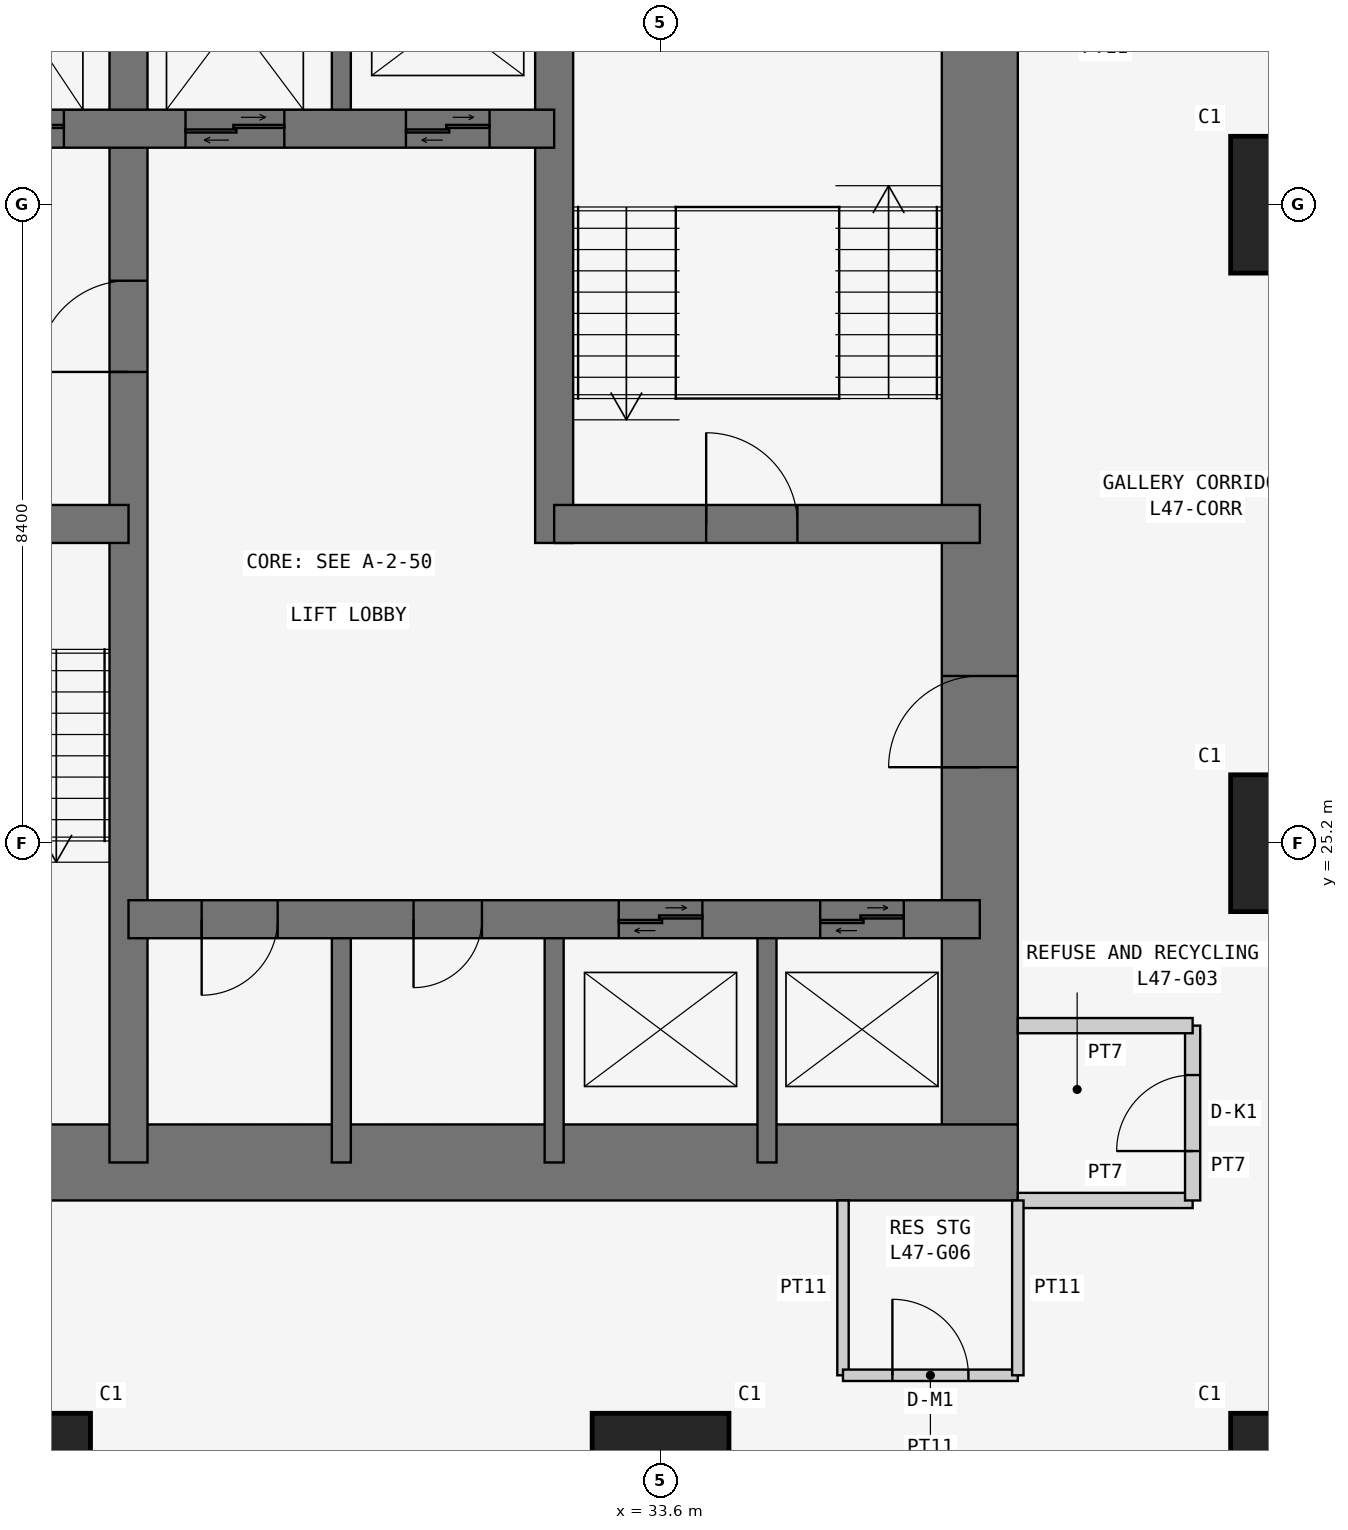
"""IFC4 building model, lengths in metres.
Left out: names, types, materials, properties, quantities, classifications, styles, units other than length and angle.
Written with IfcOpenShell. Run it as: python <this file> out.ifc"""

import sys

from ifc_helpers import new_model, si_unit, direction, frame, frame_2d, origin, origin_2d, place, context, subcontext, project, spatial, rectangle, extrude, element, fill, save


model = new_model("IFC4")
c1 = context("Model", 3, precision=1e-05, world=origin(), true_north=direction((0.0, 1.0)))
c2 = subcontext(c1, "Body", "Model", "MODEL_VIEW")
j1 = project(units=[si_unit("LENGTHUNIT", "METRE"), si_unit("PLANEANGLEUNIT", "RADIAN")], contexts=[c1])
p1 = place(None, origin())
s1 = spatial("IfcSite", under=j1, at=p1, CompositionType="ELEMENT")
p2 = place(p1, origin())
s2 = spatial("IfcBuilding", under=s1, at=p2, CompositionType="ELEMENT")
p3 = place(p2, frame((0.0, 0.0, 183.3)))
s3 = spatial("IfcBuildingStorey", under=s2, at=p3, CompositionType="ELEMENT", Elevation=183.3)
for number, where, z_axis, x_axis in (
    (1, (25.2, 16.8, 0.0), (0.0, 0.0, 1.0), (1.0, 0.0, 0.0)),
    (2, (33.6, 16.8, 0.0), (0.0, 0.0, 1.0), (1.0, 0.0, 0.0)),
    (3, (42.0, 16.8, 0.0), (0.0, 0.0, 1.0), (1.0, 0.0, 0.0)),
    (4, (42.0, 25.2, 0.0), (0.0, 0.0, 1.0), (1.0, 0.0, 0.0)),
    (5, (42.0, 33.6, 0.0), (0.0, 0.0, 1.0), (1.0, 0.0, 0.0)),
):
    element("IfcColumn", number, at=place(p3, frame(where, z_axis=z_axis, x_axis=x_axis)), inside=s3, PredefinedType="COLUMN", context=c2, shape_type="SweptSolid", body=[
        extrude(rectangle(XDim=1.8, YDim=1.8, at=origin_2d()), origin(), (0.0, 0.0, 1.0), 3.6),
    ])
p4 = place(p3, frame((21.0, 21.0, 0.0), z_axis=(0.0, 0.0, 1.0), x_axis=(1.0, 0.0, 0.0)))
e6 = element("IfcWall", 6, at=p4, inside=s3, PredefinedType="SHEAR", context=c2, shape_type="SweptSolid", body=[
    extrude(rectangle(XDim=17.3, YDim=1.0, at=frame_2d((8.65, 0.0))), origin(), (0.0, 0.0, 1.0), 3.6),
])
p5 = place(p3, frame((37.8, 21.0, 0.0), z_axis=(0.0, 0.0, 1.0), x_axis=(0.0, 1.0, 0.0)))
e7 = element("IfcWall", 7, at=p5, inside=s3, PredefinedType="SHEAR", context=c2, shape_type="SweptSolid", body=[
    extrude(rectangle(XDim=17.3, YDim=1.0, at=frame_2d((8.65, 0.0))), origin(), (0.0, 0.0, 1.0), 3.6),
])
p6 = place(p5, frame((5.2, 0.0, 0.0)))
e8 = element("IfcOpeningElement", 8, at=p6, cuts=e7, PredefinedType="OPENING", context=c2, shape_type="SweptSolid", body=[
    extrude(rectangle(XDim=1.2, YDim=2.1, at=frame_2d((0.6, 1.05))), frame((0.0, 0.51, 0.0), z_axis=(0.0, -1.0, 0.0), x_axis=(1.0, 0.0, 0.0)), (0.0, 0.0, 1.0), 1.02),
])
p7 = place(p3, frame((26.6, 21.0, 0.0), z_axis=(0.0, 0.0, 1.0), x_axis=(0.0, 1.0, 0.0)))
e9 = element("IfcWall", 9, at=p7, inside=s3, PredefinedType="SHEAR", context=c2, shape_type="SweptSolid", body=[
    extrude(rectangle(XDim=16.8, YDim=0.5, at=frame_2d((8.4, 0.0))), origin(), (0.0, 0.0, 1.0), 3.6),
])
p8 = place(p7, frame((10.4, 0.0, 0.0)))
e10 = element("IfcOpeningElement", 10, at=p8, cuts=e9, PredefinedType="OPENING", context=c2, shape_type="SweptSolid", body=[
    extrude(rectangle(XDim=1.2, YDim=2.1, at=frame_2d((0.6, 1.05))), frame((0.0, 0.26, 0.0), z_axis=(0.0, -1.0, 0.0), x_axis=(1.0, 0.0, 0.0)), (0.0, 0.0, 1.0), 0.52),
])
p9 = place(p3, frame((21.0, 29.4, 0.0), z_axis=(0.0, 0.0, 1.0), x_axis=(1.0, 0.0, 0.0)))
e11 = element("IfcWall", 11, at=p9, inside=s3, PredefinedType="SHEAR", context=c2, shape_type="SweptSolid", body=[
    extrude(rectangle(XDim=5.6, YDim=0.5, at=frame_2d((2.8, 0.0))), origin(), (0.0, 0.0, 1.0), 3.6),
])
p10 = place(p9, frame((2.3, 0.0, 0.0)))
e12 = element("IfcOpeningElement", 12, at=p10, cuts=e11, PredefinedType="OPENING", context=c2, shape_type="SweptSolid", body=[
    extrude(rectangle(XDim=1.2, YDim=2.1, at=frame_2d((0.6, 1.05))), frame((0.0, 0.26, 0.0), z_axis=(0.0, -1.0, 0.0), x_axis=(1.0, 0.0, 0.0)), (0.0, 0.0, 1.0), 0.52),
])
p11 = place(p3, frame((21.0, 34.6, 0.0), z_axis=(0.0, 0.0, 1.0), x_axis=(1.0, 0.0, 0.0)))
e13 = element("IfcWall", 13, at=p11, inside=s3, PredefinedType="SHEAR", context=c2, shape_type="SweptSolid", body=[
    extrude(rectangle(XDim=11.2, YDim=0.5, at=frame_2d((5.6, 0.0))), origin(), (0.0, 0.0, 1.0), 3.6),
])
p12 = place(p11, frame((9.25, 0.0, 0.0)))
e14 = element("IfcOpeningElement", 14, at=p12, cuts=e13, PredefinedType="OPENING", context=c2, shape_type="SweptSolid", body=[
    extrude(rectangle(XDim=1.1, YDim=2.1, at=frame_2d((0.55, 1.05))), frame((0.0, 0.26, 0.0), z_axis=(0.0, -1.0, 0.0), x_axis=(1.0, 0.0, 0.0)), (0.0, 0.0, 1.0), 0.52),
])
p13 = place(p11, frame((1.0, 0.0, 0.0)))
e15 = element("IfcOpeningElement", 15, at=p13, cuts=e13, PredefinedType="OPENING", context=c2, shape_type="SweptSolid", body=[
    extrude(rectangle(XDim=1.1, YDim=2.1, at=frame_2d((0.55, 1.05))), frame((0.0, 0.26, 0.0), z_axis=(0.0, -1.0, 0.0), x_axis=(1.0, 0.0, 0.0)), (0.0, 0.0, 1.0), 0.52),
])
p14 = place(p11, frame((3.65, 0.0, 0.0)))
e16 = element("IfcOpeningElement", 16, at=p14, cuts=e13, PredefinedType="OPENING", context=c2, shape_type="SweptSolid", body=[
    extrude(rectangle(XDim=1.1, YDim=2.1, at=frame_2d((0.55, 1.05))), frame((0.0, 0.26, 0.0), z_axis=(0.0, -1.0, 0.0), x_axis=(1.0, 0.0, 0.0)), (0.0, 0.0, 1.0), 0.52),
])
p15 = place(p11, frame((6.35, 0.0, 0.0)))
e17 = element("IfcOpeningElement", 17, at=p15, cuts=e13, PredefinedType="OPENING", context=c2, shape_type="SweptSolid", body=[
    extrude(rectangle(XDim=1.3, YDim=2.1, at=frame_2d((0.65, 1.05))), frame((0.0, 0.26, 0.0), z_axis=(0.0, -1.0, 0.0), x_axis=(1.0, 0.0, 0.0)), (0.0, 0.0, 1.0), 0.52),
])
p16 = place(p3, frame((26.6, 24.2, 0.0), z_axis=(0.0, 0.0, 1.0), x_axis=(1.0, 0.0, 0.0)))
e18 = element("IfcWall", 18, at=p16, inside=s3, PredefinedType="SHEAR", context=c2, shape_type="SweptSolid", body=[
    extrude(rectangle(XDim=11.2, YDim=0.5, at=frame_2d((5.6, 0.0))), origin(), (0.0, 0.0, 1.0), 3.6),
])
p17 = place(p16, frame((0.962, 0.0, 0.0)))
e19 = element("IfcOpeningElement", 19, at=p17, cuts=e18, PredefinedType="OPENING", context=c2, shape_type="SweptSolid", body=[
    extrude(rectangle(XDim=1.0, YDim=2.1, at=frame_2d((0.5, 1.05))), frame((0.0, 0.26, 0.0), z_axis=(0.0, -1.0, 0.0), x_axis=(1.0, 0.0, 0.0)), (0.0, 0.0, 1.0), 0.52),
])
p18 = place(p16, frame((3.75, 0.0, 0.0)))
e20 = element("IfcOpeningElement", 20, at=p18, cuts=e18, PredefinedType="OPENING", context=c2, shape_type="SweptSolid", body=[
    extrude(rectangle(XDim=0.9, YDim=2.1, at=frame_2d((0.45, 1.05))), frame((0.0, 0.26, 0.0), z_axis=(0.0, -1.0, 0.0), x_axis=(1.0, 0.0, 0.0)), (0.0, 0.0, 1.0), 0.52),
])
p19 = place(p16, frame((6.45, 0.0, 0.0)))
e21 = element("IfcOpeningElement", 21, at=p19, cuts=e18, PredefinedType="OPENING", context=c2, shape_type="SweptSolid", body=[
    extrude(rectangle(XDim=1.1, YDim=2.1, at=frame_2d((0.55, 1.05))), frame((0.0, 0.26, 0.0), z_axis=(0.0, -1.0, 0.0), x_axis=(1.0, 0.0, 0.0)), (0.0, 0.0, 1.0), 0.52),
])
p20 = place(p16, frame((9.1, 0.0, 0.0)))
e22 = element("IfcOpeningElement", 22, at=p20, cuts=e18, PredefinedType="OPENING", context=c2, shape_type="SweptSolid", body=[
    extrude(rectangle(XDim=1.1, YDim=2.1, at=frame_2d((0.55, 1.05))), frame((0.0, 0.26, 0.0), z_axis=(0.0, -1.0, 0.0), x_axis=(1.0, 0.0, 0.0)), (0.0, 0.0, 1.0), 0.52),
])
p21 = place(p3, frame((32.2, 29.15, 0.0), z_axis=(0.0, 0.0, 1.0), x_axis=(0.0, 1.0, 0.0)))
e23 = element("IfcWall", 23, at=p21, inside=s3, PredefinedType="SHEAR", context=c2, shape_type="SweptSolid", body=[
    extrude(rectangle(XDim=8.65, YDim=0.5, at=frame_2d((4.325, 0.0))), origin(), (0.0, 0.0, 1.0), 3.6),
])
p22 = place(p3, frame((32.2, 29.4, 0.0), z_axis=(0.0, 0.0, 1.0), x_axis=(1.0, 0.0, 0.0)))
e24 = element("IfcWall", 24, at=p22, inside=s3, PredefinedType="SHEAR", context=c2, shape_type="SweptSolid", body=[
    extrude(rectangle(XDim=5.6, YDim=0.5, at=frame_2d((2.8, 0.0))), origin(), (0.0, 0.0, 1.0), 3.6),
])
p23 = place(p22, frame((2.0, 0.0, 0.0)))
e25 = element("IfcOpeningElement", 25, at=p23, cuts=e24, PredefinedType="OPENING", context=c2, shape_type="SweptSolid", body=[
    extrude(rectangle(XDim=1.2, YDim=2.1, at=frame_2d((0.6, 1.05))), frame((0.0, 0.26, 0.0), z_axis=(0.0, -1.0, 0.0), x_axis=(1.0, 0.0, 0.0)), (0.0, 0.0, 1.0), 0.52),
])
for number, where, z_axis, x_axis in (
    (26, (29.4, 21.0, 0.0), (0.0, 0.0, 1.0), (0.0, 1.0, 0.0)),
    (27, (32.2, 21.0, 0.0), (0.0, 0.0, 1.0), (0.0, 1.0, 0.0)),
    (28, (35.0, 21.0, 0.0), (0.0, 0.0, 1.0), (0.0, 1.0, 0.0)),
    (29, (29.4, 34.6, 0.0), (0.0, 0.0, 1.0), (0.0, 1.0, 0.0)),
):
    element("IfcWall", number, at=place(p3, frame(where, z_axis=z_axis, x_axis=x_axis)), inside=s3, PredefinedType="SHEAR", context=c2, shape_type="SweptSolid", body=[
        extrude(rectangle(XDim=3.2, YDim=0.25, at=frame_2d((1.6, 0.0))), origin(), (0.0, 0.0, 1.0), 3.6),
    ])
p24 = place(p3, frame((38.3, 20.5, 0.0), z_axis=(0.0, 0.0, 1.0), x_axis=(1.0, 0.0, 0.0)))
e30 = element("IfcWall", 30, at=p24, inside=s3, PredefinedType="PARTITIONING", context=c2, shape_type="SweptSolid", body=[
    extrude(rectangle(XDim=2.3, YDim=0.2, at=frame_2d((1.15, 0.0))), origin(), (0.0, 0.0, 1.0), 3.45),
])
p25 = place(p3, frame((40.6, 20.5, 0.0), z_axis=(0.0, 0.0, 1.0), x_axis=(0.0, 1.0, 0.0)))
e31 = element("IfcWall", 31, at=p25, inside=s3, PredefinedType="PARTITIONING", context=c2, shape_type="SweptSolid", body=[
    extrude(rectangle(XDim=2.3, YDim=0.2, at=frame_2d((1.15, 0.0))), origin(), (0.0, 0.0, 1.0), 3.45),
])
p26 = place(p25, frame((0.65, 0.0, 0.0)))
e32 = element("IfcOpeningElement", 32, at=p26, cuts=e31, PredefinedType="OPENING", context=c2, shape_type="SweptSolid", body=[
    extrude(rectangle(XDim=1.0, YDim=2.1, at=frame_2d((0.5, 1.05))), frame((0.0, 0.11, 0.0), z_axis=(0.0, -1.0, 0.0), x_axis=(1.0, 0.0, 0.0)), (0.0, 0.0, 1.0), 0.22),
])
p27 = place(p3, frame((40.6, 22.8, 0.0), z_axis=(0.0, 0.0, 1.0), x_axis=(-1.0, 0.0, 0.0)))
e33 = element("IfcWall", 33, at=p27, inside=s3, PredefinedType="PARTITIONING", context=c2, shape_type="SweptSolid", body=[
    extrude(rectangle(XDim=2.3, YDim=0.2, at=frame_2d((1.15, 0.0))), origin(), (0.0, 0.0, 1.0), 3.45),
])
p28 = place(p3, frame((36.0, 20.5, 0.0), z_axis=(0.0, 0.0, 1.0), x_axis=(0.0, -1.0, 0.0)))
e34 = element("IfcWall", 34, at=p28, inside=s3, PredefinedType="PARTITIONING", context=c2, shape_type="SweptSolid", body=[
    extrude(rectangle(XDim=2.3, YDim=0.15, at=frame_2d((1.15, 0.0))), origin(), (0.0, 0.0, 1.0), 3.45),
])
p29 = place(p3, frame((36.0, 18.2, 0.0), z_axis=(0.0, 0.0, 1.0), x_axis=(1.0, 0.0, 0.0)))
e35 = element("IfcWall", 35, at=p29, inside=s3, PredefinedType="PARTITIONING", context=c2, shape_type="SweptSolid", body=[
    extrude(rectangle(XDim=2.3, YDim=0.15, at=frame_2d((1.15, 0.0))), origin(), (0.0, 0.0, 1.0), 3.45),
])
p30 = place(p29, frame((0.65, 0.0, 0.0)))
e36 = element("IfcOpeningElement", 36, at=p30, cuts=e35, PredefinedType="OPENING", context=c2, shape_type="SweptSolid", body=[
    extrude(rectangle(XDim=1.0, YDim=2.1, at=frame_2d((0.5, 1.05))), frame((0.0, 0.085, 0.0), z_axis=(0.0, -1.0, 0.0), x_axis=(1.0, 0.0, 0.0)), (0.0, 0.0, 1.0), 0.17),
])
p31 = place(p3, frame((38.3, 18.2, 0.0), z_axis=(0.0, 0.0, 1.0), x_axis=(0.0, 1.0, 0.0)))
e37 = element("IfcWall", 37, at=p31, inside=s3, PredefinedType="PARTITIONING", context=c2, shape_type="SweptSolid", body=[
    extrude(rectangle(XDim=2.3, YDim=0.15, at=frame_2d((1.15, 0.0))), origin(), (0.0, 0.0, 1.0), 3.45),
])
p32 = place(p26, origin())
e38 = element("IfcDoor", 38, at=p32, inside=s3, OperationType="SINGLE_SWING_LEFT", PredefinedType="DOOR", context=c2, shape_type="SweptSolid", body=[
    extrude(rectangle(XDim=1.0, YDim=2.1, at=frame_2d((0.5, 1.05))), frame((0.0, 0.025, 0.0), z_axis=(0.0, -1.0, 0.0), x_axis=(1.0, 0.0, 0.0)), (0.0, 0.0, 1.0), 0.05),
])
fill(e32, e38)
p33 = place(p30, origin())
e39 = element("IfcDoor", 39, at=p33, inside=s3, OperationType="SINGLE_SWING_LEFT", PredefinedType="DOOR", context=c2, shape_type="SweptSolid", body=[
    extrude(rectangle(XDim=1.0, YDim=2.1, at=frame_2d((0.5, 1.05))), frame((0.0, 0.025, 0.0), z_axis=(0.0, -1.0, 0.0), x_axis=(1.0, 0.0, 0.0)), (0.0, 0.0, 1.0), 0.05),
])
fill(e36, e39)
p34 = place(p8, origin())
e40 = element("IfcDoor", 40, at=p34, inside=s3, OperationType="SINGLE_SWING_LEFT", PredefinedType="DOOR", context=c2, shape_type="SweptSolid", body=[
    extrude(rectangle(XDim=1.2, YDim=2.1, at=frame_2d((0.6, 1.05))), frame((0.0, 0.025, 0.0), z_axis=(0.0, -1.0, 0.0), x_axis=(1.0, 0.0, 0.0)), (0.0, 0.0, 1.0), 0.05),
])
fill(e10, e40)
p35 = place(p6, origin())
e41 = element("IfcDoor", 41, at=p35, inside=s3, OperationType="SINGLE_SWING_LEFT", PredefinedType="DOOR", context=c2, shape_type="SweptSolid", body=[
    extrude(rectangle(XDim=1.2, YDim=2.1, at=frame_2d((0.6, 1.05))), frame((0.0, 0.025, 0.0), z_axis=(0.0, -1.0, 0.0), x_axis=(1.0, 0.0, 0.0)), (0.0, 0.0, 1.0), 0.05),
])
fill(e8, e41)
p36 = place(p23, origin())
e42 = element("IfcDoor", 42, at=p36, inside=s3, OperationType="SINGLE_SWING_LEFT", PredefinedType="DOOR", context=c2, shape_type="SweptSolid", body=[
    extrude(rectangle(XDim=1.2, YDim=2.1, at=frame_2d((0.6, 1.05))), frame((0.0, 0.025, 0.0), z_axis=(0.0, -1.0, 0.0), x_axis=(1.0, 0.0, 0.0)), (0.0, 0.0, 1.0), 0.05),
])
fill(e25, e42)
p37 = place(p17, frame((1.0, 0.0, 0.0), z_axis=(0.0, 0.0, 1.0), x_axis=(-1.0, 0.0, 0.0)))
e43 = element("IfcDoor", 43, at=p37, inside=s3, OperationType="SINGLE_SWING_RIGHT", PredefinedType="DOOR", context=c2, shape_type="SweptSolid", body=[
    extrude(rectangle(XDim=1.0, YDim=2.1, at=frame_2d((0.5, 1.05))), frame((0.0, 0.025, 0.0), z_axis=(0.0, -1.0, 0.0), x_axis=(1.0, 0.0, 0.0)), (0.0, 0.0, 1.0), 0.05),
])
fill(e19, e43)
p38 = place(p18, frame((0.9, 0.0, 0.0), z_axis=(0.0, 0.0, 1.0), x_axis=(-1.0, 0.0, 0.0)))
e44 = element("IfcDoor", 44, at=p38, inside=s3, OperationType="SINGLE_SWING_RIGHT", PredefinedType="DOOR", context=c2, shape_type="SweptSolid", body=[
    extrude(rectangle(XDim=0.9, YDim=2.1, at=frame_2d((0.45, 1.05))), frame((0.0, 0.025, 0.0), z_axis=(0.0, -1.0, 0.0), x_axis=(1.0, 0.0, 0.0)), (0.0, 0.0, 1.0), 0.05),
])
fill(e20, e44)
p39 = place(p19, origin())
e45 = element("IfcDoor", 45, at=p39, inside=s3, OperationType="DOUBLE_DOOR_SLIDING", PredefinedType="DOOR", context=c2, shape_type="SweptSolid", body=[
    extrude(rectangle(XDim=1.1, YDim=2.1, at=frame_2d((0.55, 1.05))), frame((0.0, 0.025, 0.0), z_axis=(0.0, -1.0, 0.0), x_axis=(1.0, 0.0, 0.0)), (0.0, 0.0, 1.0), 0.05),
])
fill(e21, e45)
p40 = place(p20, origin())
e46 = element("IfcDoor", 46, at=p40, inside=s3, OperationType="DOUBLE_DOOR_SLIDING", PredefinedType="DOOR", context=c2, shape_type="SweptSolid", body=[
    extrude(rectangle(XDim=1.1, YDim=2.1, at=frame_2d((0.55, 1.05))), frame((0.0, 0.025, 0.0), z_axis=(0.0, -1.0, 0.0), x_axis=(1.0, 0.0, 0.0)), (0.0, 0.0, 1.0), 0.05),
])
fill(e22, e46)
p41 = place(p12, origin())
e47 = element("IfcDoor", 47, at=p41, inside=s3, OperationType="DOUBLE_DOOR_SLIDING", PredefinedType="DOOR", context=c2, shape_type="SweptSolid", body=[
    extrude(rectangle(XDim=1.1, YDim=2.1, at=frame_2d((0.55, 1.05))), frame((0.0, 0.025, 0.0), z_axis=(0.0, -1.0, 0.0), x_axis=(1.0, 0.0, 0.0)), (0.0, 0.0, 1.0), 0.05),
])
fill(e14, e47)
p42 = place(p14, origin())
e48 = element("IfcDoor", 48, at=p42, inside=s3, OperationType="DOUBLE_DOOR_SLIDING", PredefinedType="DOOR", context=c2, shape_type="SweptSolid", body=[
    extrude(rectangle(XDim=1.1, YDim=2.1, at=frame_2d((0.55, 1.05))), frame((0.0, 0.025, 0.0), z_axis=(0.0, -1.0, 0.0), x_axis=(1.0, 0.0, 0.0)), (0.0, 0.0, 1.0), 0.05),
])
fill(e16, e48)
p43 = place(p15, origin())
e49 = element("IfcDoor", 49, at=p43, inside=s3, OperationType="DOUBLE_DOOR_SLIDING", PredefinedType="DOOR", context=c2, shape_type="SweptSolid", body=[
    extrude(rectangle(XDim=1.3, YDim=2.1, at=frame_2d((0.65, 1.05))), frame((0.0, 0.025, 0.0), z_axis=(0.0, -1.0, 0.0), x_axis=(1.0, 0.0, 0.0)), (0.0, 0.0, 1.0), 0.05),
])
fill(e17, e49)
save(model, sys.argv[1])
